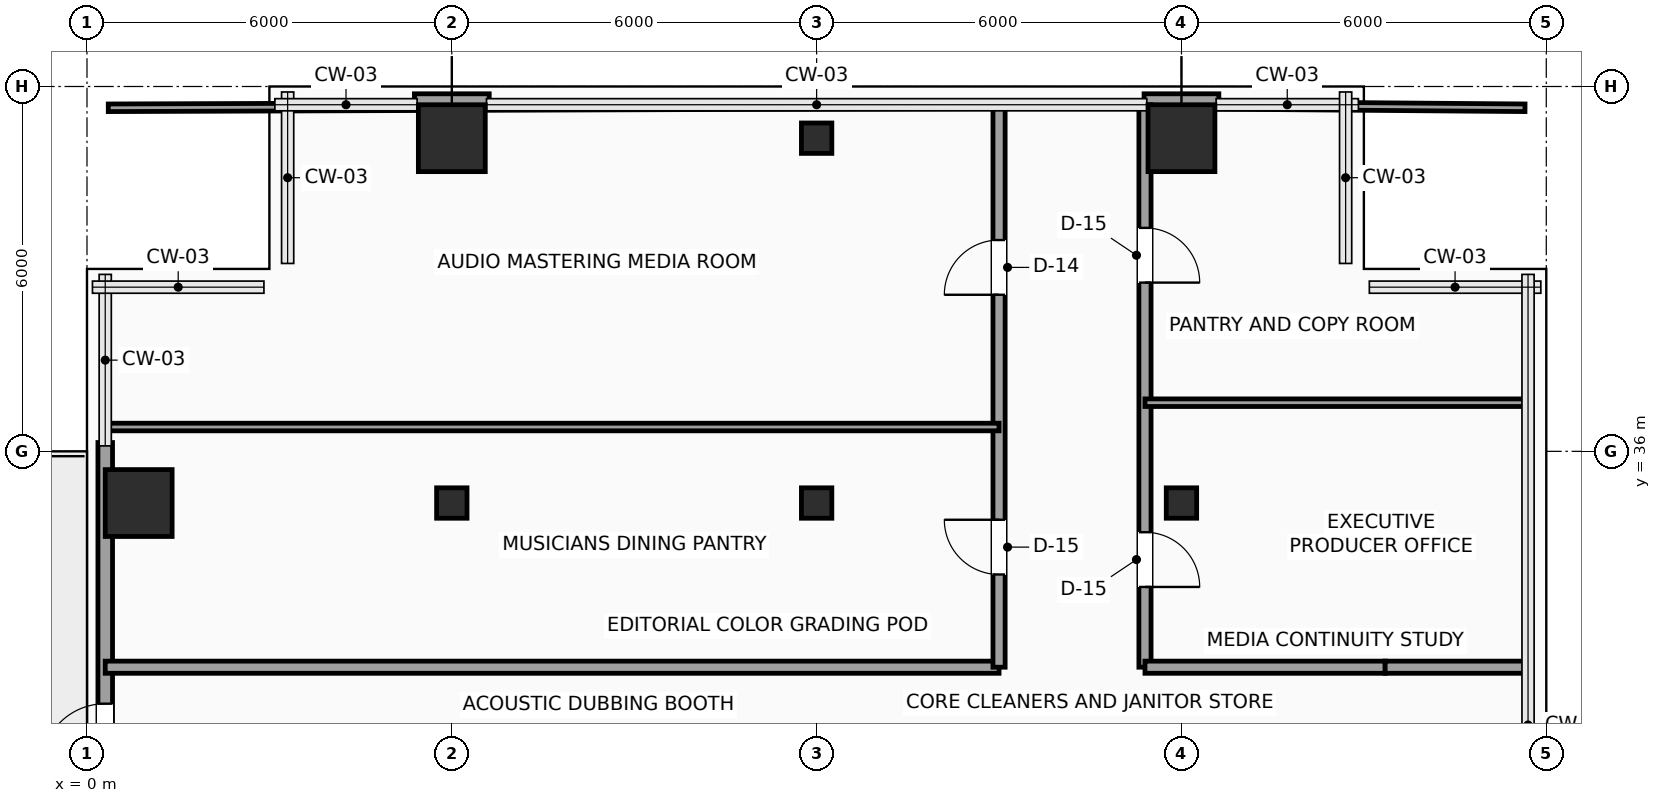
"""IFC4 building model, lengths in metres.
Left out: names, types, materials, properties, quantities, classifications, styles, units other than length and angle.
Written with IfcOpenShell. Run it as: python <this file> out.ifc"""

import sys

from ifc_helpers import new_model, si_unit, direction, frame, frame_2d, origin, origin_2d, place, context, subcontext, project, spatial, rectangle, hollow_rectangle, extrude, element, fill, save


model = new_model("IFC4")
c1 = context("Model", 3, precision=1e-05, world=origin(), true_north=direction((0.0, 1.0)))
c2 = subcontext(c1, "Body", "Model", "MODEL_VIEW")
j1 = project(units=[si_unit("LENGTHUNIT", "METRE"), si_unit("PLANEANGLEUNIT", "RADIAN")], contexts=[c1])
p1 = place(None, origin())
s1 = spatial("IfcSite", under=j1, at=p1, CompositionType="ELEMENT")
p2 = place(p1, origin())
s2 = spatial("IfcBuilding", under=s1, at=p2, CompositionType="ELEMENT")
p3 = place(p2, frame((0.0, 0.0, 149.4)))
s3 = spatial("IfcBuildingStorey", under=s2, at=p3, CompositionType="ELEMENT", Elevation=149.4)
p4 = place(p3, frame((0.85, 35.15, 0.0), z_axis=(0.0, 0.0, 1.0), x_axis=(1.0, 0.0, 0.0)))
e1 = element("IfcColumn", 1, at=p4, inside=s3, PredefinedType="COLUMN", context=c2, shape_type="SweptSolid", body=[
    extrude(rectangle(XDim=1.1, YDim=1.1, at=origin_2d()), origin(), (0.0, 0.0, 1.0), 3.75),
])
p5 = place(p3, frame((6.0, 35.15, 0.0), z_axis=(0.0, 0.0, 1.0), x_axis=(1.0, 0.0, 0.0)))
e2 = element("IfcColumn", 2, at=p5, inside=s3, PredefinedType="COLUMN", context=c2, shape_type="SweptSolid", body=[
    extrude(hollow_rectangle(XDim=0.5, YDim=0.5, WallThickness=0.025, InnerFilletRadius=0.025, OuterFilletRadius=0.04, at=origin_2d()), origin(), (0.0, 0.0, 1.0), 3.75),
])
p6 = place(p3, frame((6.0, 41.15, 0.0), z_axis=(0.0, 0.0, 1.0), x_axis=(1.0, 0.0, 0.0)))
e3 = element("IfcColumn", 3, at=p6, inside=s3, PredefinedType="COLUMN", context=c2, shape_type="SweptSolid", body=[
    extrude(rectangle(XDim=1.1, YDim=1.1, at=origin_2d()), origin(), (0.0, 0.0, 1.0), 3.75),
])
for number, where, z_axis, x_axis in (
    (4, (12.0, 35.15, 0.0), (0.0, 0.0, 1.0), (1.0, 0.0, 0.0)),
    (5, (12.0, 41.15, 0.0), (0.0, 0.0, 1.0), (1.0, 0.0, 0.0)),
    (6, (18.0, 35.15, 0.0), (0.0, 0.0, 1.0), (1.0, 0.0, 0.0)),
):
    element("IfcColumn", number, at=place(p3, frame(where, z_axis=z_axis, x_axis=x_axis)), inside=s3, PredefinedType="COLUMN", context=c2, shape_type="SweptSolid", body=[
        extrude(hollow_rectangle(XDim=0.5, YDim=0.5, WallThickness=0.025, InnerFilletRadius=0.025, OuterFilletRadius=0.04, at=origin_2d()), origin(), (0.0, 0.0, 1.0), 3.75),
    ])
p7 = place(p3, frame((18.0, 41.15, 0.0), z_axis=(0.0, 0.0, 1.0), x_axis=(1.0, 0.0, 0.0)))
e7 = element("IfcColumn", 7, at=p7, inside=s3, PredefinedType="COLUMN", context=c2, shape_type="SweptSolid", body=[
    extrude(rectangle(XDim=1.1, YDim=1.1, at=origin_2d()), origin(), (0.0, 0.0, 1.0), 3.75),
])
p8 = place(p3, frame((0.3, 26.855, 0.0), z_axis=(0.0, 0.0, 1.0), x_axis=(0.0, 1.0, 0.0)))
e8 = element("IfcWall", 8, at=p8, inside=s3, PredefinedType="SOLIDWALL", context=c2, shape_type="SweptSolid", body=[
    extrude(rectangle(XDim=9.29, YDim=0.24, at=frame_2d((4.645, 0.0))), origin(), (0.0, 0.0, 1.0), 3.525),
])
p9 = place(p8, frame((3.945, 0.0, 0.0)))
e9 = element("IfcOpeningElement", 9, at=p9, cuts=e8, PredefinedType="OPENING", context=c2, shape_type="SweptSolid", body=[
    extrude(rectangle(XDim=1.05, YDim=2.2, at=frame_2d((0.525, 1.1))), frame((0.0, 0.13, 0.0), z_axis=(0.0, -1.0, 0.0), x_axis=(1.0, 0.0, 0.0)), (0.0, 0.0, 1.0), 0.26),
])
for number, where, z_axis, x_axis in (
    (10, (5.385, 41.76, 0.0), (0.0, 0.0, 1.0), (1.0, 0.0, 0.0)),
    (11, (17.385, 41.76, 0.0), (0.0, 0.0, 1.0), (1.0, 0.0, 0.0)),
):
    element("IfcWall", number, at=place(p3, frame(where, z_axis=z_axis, x_axis=x_axis)), inside=s3, PredefinedType="SOLIDWALL", context=c2, shape_type="SweptSolid", body=[
        extrude(rectangle(XDim=1.23, YDim=0.24, at=frame_2d((0.615, 0.0))), origin(), (0.0, 0.0, 1.0), 3.525),
    ])
p10 = place(p3, frame((0.3, 32.45, 0.0), z_axis=(0.0, 0.0, 1.0), x_axis=(1.0, 0.0, 0.0)))
e12 = element("IfcWall", 12, at=p10, inside=s3, PredefinedType="SOLIDWALL", context=c2, shape_type="SweptSolid", body=[
    extrude(rectangle(XDim=14.7, YDim=0.2, at=frame_2d((7.35, 0.0))), origin(), (0.0, 0.0, 1.0), 3.525),
])
p11 = place(p3, frame((15.0, 32.45, 0.0), z_axis=(0.0, 0.0, 1.0), x_axis=(0.0, 1.0, 0.0)))
e13 = element("IfcWall", 13, at=p11, inside=s3, PredefinedType="SOLIDWALL", context=c2, shape_type="SweptSolid", body=[
    extrude(rectangle(XDim=9.25, YDim=0.2, at=frame_2d((4.625, 0.0))), origin(), (0.0, 0.0, 1.0), 3.525),
])
p12 = place(p11, frame((1.525, 0.0, 0.0)))
e14 = element("IfcOpeningElement", 14, at=p12, cuts=e13, PredefinedType="OPENING", context=c2, shape_type="SweptSolid", body=[
    extrude(rectangle(XDim=0.9, YDim=2.1, at=frame_2d((0.45, 1.05))), frame((0.0, 0.11, 0.0), z_axis=(0.0, -1.0, 0.0), x_axis=(1.0, 0.0, 0.0)), (0.0, 0.0, 1.0), 0.22),
])
p13 = place(p11, frame((6.125, 0.0, 0.0)))
e15 = element("IfcOpeningElement", 15, at=p13, cuts=e13, PredefinedType="OPENING", context=c2, shape_type="SweptSolid", body=[
    extrude(rectangle(XDim=0.9, YDim=2.1, at=frame_2d((0.45, 1.05))), frame((0.0, 0.11, 0.0), z_axis=(0.0, -1.0, 0.0), x_axis=(1.0, 0.0, 0.0)), (0.0, 0.0, 1.0), 0.22),
])
p14 = place(p3, frame((17.4, 41.7, 0.0), z_axis=(0.0, 0.0, 1.0), x_axis=(0.0, -1.0, 0.0)))
e16 = element("IfcWall", 16, at=p14, inside=s3, PredefinedType="SOLIDWALL", context=c2, shape_type="SweptSolid", body=[
    extrude(rectangle(XDim=9.25, YDim=0.2, at=frame_2d((4.625, 0.0))), origin(), (0.0, 0.0, 1.0), 3.525),
])
p15 = place(p14, frame((7.03, 0.0, 0.0)))
e17 = element("IfcOpeningElement", 17, at=p15, cuts=e16, PredefinedType="OPENING", context=c2, shape_type="SweptSolid", body=[
    extrude(rectangle(XDim=0.9, YDim=2.1, at=frame_2d((0.45, 1.05))), frame((0.0, 0.11, 0.0), z_axis=(0.0, -1.0, 0.0), x_axis=(1.0, 0.0, 0.0)), (0.0, 0.0, 1.0), 0.22),
])
p16 = place(p14, frame((2.025, 0.0, 0.0)))
e18 = element("IfcOpeningElement", 18, at=p16, cuts=e16, PredefinedType="OPENING", context=c2, shape_type="SweptSolid", body=[
    extrude(rectangle(XDim=0.9, YDim=2.1, at=frame_2d((0.45, 1.05))), frame((0.0, 0.11, 0.0), z_axis=(0.0, -1.0, 0.0), x_axis=(1.0, 0.0, 0.0)), (0.0, 0.0, 1.0), 0.22),
])
p17 = place(p3, frame((17.4, 32.45, 0.0), z_axis=(0.0, 0.0, 1.0), x_axis=(1.0, 0.0, 0.0)))
e19 = element("IfcWall", 19, at=p17, inside=s3, PredefinedType="SOLIDWALL", context=c2, shape_type="SweptSolid", body=[
    extrude(rectangle(XDim=3.95, YDim=0.2, at=frame_2d((1.975, 0.0))), origin(), (0.0, 0.0, 1.0), 3.525),
])
p18 = place(p3, frame((21.35, 32.45, 0.0), z_axis=(0.0, 0.0, 1.0), x_axis=(1.0, 0.0, 0.0)))
e20 = element("IfcWall", 20, at=p18, inside=s3, PredefinedType="SOLIDWALL", context=c2, shape_type="SweptSolid", body=[
    extrude(rectangle(XDim=2.35, YDim=0.2, at=frame_2d((1.175, 0.0))), origin(), (0.0, 0.0, 1.0), 3.525),
])
p19 = place(p3, frame((0.3, 36.4, 0.0), z_axis=(0.0, 0.0, 1.0), x_axis=(1.0, 0.0, 0.0)))
e21 = element("IfcWall", 21, at=p19, inside=s3, PredefinedType="PARTITIONING", context=c2, shape_type="SweptSolid", body=[
    extrude(rectangle(XDim=14.7, YDim=0.125, at=frame_2d((7.35, 0.0))), origin(), (0.0, 0.0, 1.0), 3.525),
])
p20 = place(p3, frame((0.35, 41.65, 0.0), z_axis=(0.0, 0.0, 1.0), x_axis=(0.999994073761, 0.003442737683, 0.0)))
e22 = element("IfcWall", 22, at=p20, inside=s3, PredefinedType="PARTITIONING", context=c2, shape_type="SweptSolid", body=[
    extrude(rectangle(XDim=5.035, YDim=0.125, at=frame_2d((2.518, 0.0))), origin(), (0.0, 0.0, 1.0), 3.525),
])
p21 = place(p3, frame((6.615, 41.671, 0.0), z_axis=(0.0, 0.0, 1.0), x_axis=(0.999994197557, 0.003406589638, 0.0)))
e23 = element("IfcWall", 23, at=p21, inside=s3, PredefinedType="PARTITIONING", context=c2, shape_type="SweptSolid", body=[
    extrude(rectangle(XDim=8.385, YDim=0.125, at=frame_2d((4.192, 0.0))), origin(), (0.0, 0.0, 1.0), 3.525),
])
p22 = place(p3, frame((17.4, 36.8, 0.0), z_axis=(0.0, 0.0, 1.0), x_axis=(1.0, 0.0, 0.0)))
e24 = element("IfcWall", 24, at=p22, inside=s3, PredefinedType="PARTITIONING", context=c2, shape_type="SweptSolid", body=[
    extrude(rectangle(XDim=6.3, YDim=0.125, at=frame_2d((3.15, 0.0))), origin(), (0.0, 0.0, 1.0), 3.525),
])
p23 = place(p3, frame((18.615, 41.69, 0.0), z_axis=(0.0, 0.0, 1.0), x_axis=(0.99996799533, -0.008000519771, 0.0)))
e25 = element("IfcWall", 25, at=p23, inside=s3, PredefinedType="PARTITIONING", context=c2, shape_type="SweptSolid", body=[
    extrude(rectangle(XDim=5.035, YDim=0.125, at=frame_2d((2.518, 0.0))), origin(), (0.0, 0.0, 1.0), 3.525),
])
p24 = place(p9, origin())
e26 = element("IfcDoor", 26, at=p24, inside=s3, OperationType="SINGLE_SWING_LEFT", PredefinedType="DOOR", context=c2, shape_type="SweptSolid", body=[
    extrude(rectangle(XDim=1.05, YDim=2.2, at=frame_2d((0.525, 1.1))), frame((0.0, 0.025, 0.0), z_axis=(0.0, -1.0, 0.0), x_axis=(1.0, 0.0, 0.0)), (0.0, 0.0, 1.0), 0.05),
])
fill(e9, e26)
p25 = place(p12, origin())
e27 = element("IfcDoor", 27, at=p25, inside=s3, OperationType="SINGLE_SWING_RIGHT", PredefinedType="DOOR", context=c2, shape_type="SweptSolid", body=[
    extrude(rectangle(XDim=0.9, YDim=2.1, at=frame_2d((0.45, 1.05))), frame((0.0, 0.025, 0.0), z_axis=(0.0, -1.0, 0.0), x_axis=(1.0, 0.0, 0.0)), (0.0, 0.0, 1.0), 0.05),
])
fill(e14, e27)
p26 = place(p13, origin())
e28 = element("IfcDoor", 28, at=p26, inside=s3, OperationType="SINGLE_SWING_LEFT", PredefinedType="DOOR", context=c2, shape_type="SweptSolid", body=[
    extrude(rectangle(XDim=0.9, YDim=2.1, at=frame_2d((0.45, 1.05))), frame((0.0, 0.025, 0.0), z_axis=(0.0, -1.0, 0.0), x_axis=(1.0, 0.0, 0.0)), (0.0, 0.0, 1.0), 0.05),
])
fill(e15, e28)
p27 = place(p15, origin())
e29 = element("IfcDoor", 29, at=p27, inside=s3, OperationType="SINGLE_SWING_RIGHT", PredefinedType="DOOR", context=c2, shape_type="SweptSolid", body=[
    extrude(rectangle(XDim=0.9, YDim=2.1, at=frame_2d((0.45, 1.05))), frame((0.0, 0.025, 0.0), z_axis=(0.0, -1.0, 0.0), x_axis=(1.0, 0.0, 0.0)), (0.0, 0.0, 1.0), 0.05),
])
fill(e17, e29)
p28 = place(p16, origin())
e30 = element("IfcDoor", 30, at=p28, inside=s3, OperationType="SINGLE_SWING_RIGHT", PredefinedType="DOOR", context=c2, shape_type="SweptSolid", body=[
    extrude(rectangle(XDim=0.9, YDim=2.1, at=frame_2d((0.45, 1.05))), frame((0.0, 0.025, 0.0), z_axis=(0.0, -1.0, 0.0), x_axis=(1.0, 0.0, 0.0)), (0.0, 0.0, 1.0), 0.05),
])
fill(e18, e30)
save(model, sys.argv[1])
